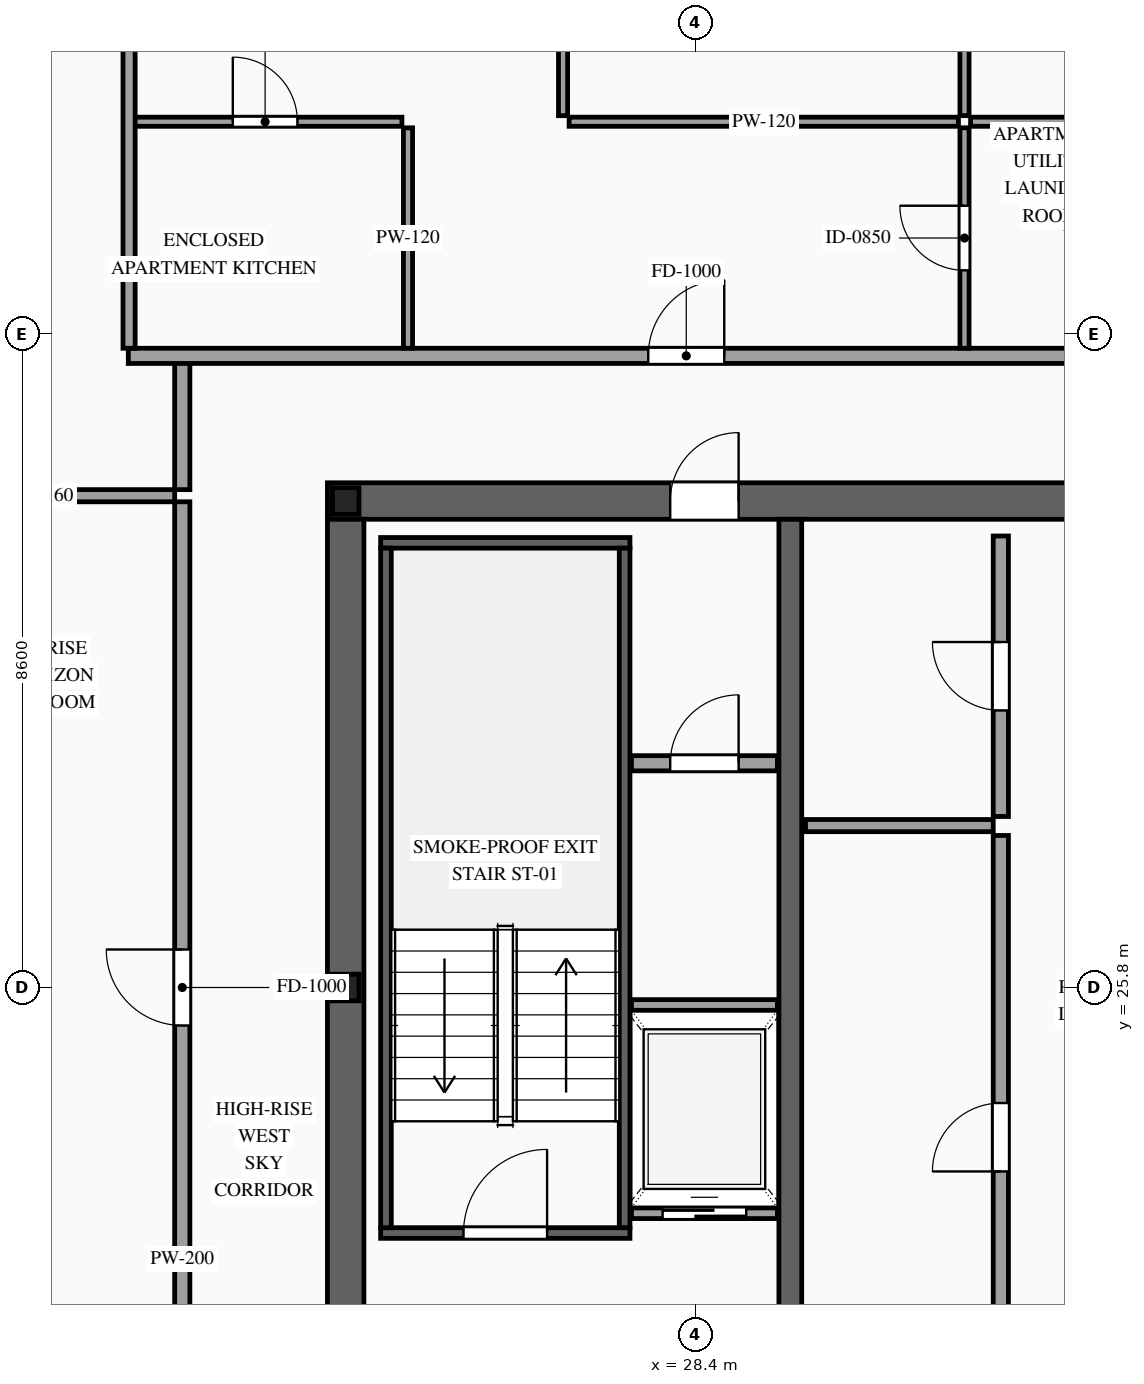
"""IFC4 building model, lengths in metres.
Left out: names, types, materials, properties, quantities, classifications, styles, units other than length and angle.
Written with IfcOpenShell. Run it as: python <this file> out.ifc"""

import sys

from ifc_helpers import new_model, si_unit, direction, frame, frame_2d, origin, origin_2d, place, context, subcontext, project, spatial, rectangle, i_section, extrude, source, transform, mapped, element, fill, save


model = new_model("IFC4")
c1 = context("Model", 3, precision=1e-05, world=origin(), true_north=direction((0.0, 1.0)))
c2 = subcontext(c1, "Body", "Model", "MODEL_VIEW")
j1 = project(units=[si_unit("LENGTHUNIT", "METRE"), si_unit("PLANEANGLEUNIT", "RADIAN")], contexts=[c1])
p1 = place(None, origin())
s1 = spatial("IfcSite", under=j1, at=p1, CompositionType="ELEMENT")
p2 = place(p1, origin())
s2 = spatial("IfcBuilding", under=s1, at=p2, CompositionType="ELEMENT")
p3 = place(p2, frame((0.0, 0.0, 311.2)))
s3 = spatial("IfcBuildingStorey", under=s2, at=p3, CompositionType="ELEMENT", Elevation=311.2)
p4 = place(p3, frame((23.56, 32.2, 0.0), z_axis=(0.0, 0.0, 1.0), x_axis=(1.0, 0.0, 0.0)))
e1 = element("IfcWall", 1, at=p4, inside=s3, PredefinedType="SHEAR", context=c2, shape_type="SweptSolid", body=[
    extrude(rectangle(XDim=26.88, YDim=0.48, at=frame_2d((13.44, 0.0))), origin(), (0.0, 0.0, 1.0), 3.5),
])
p5 = place(p4, frame((4.51, 0.0, 0.0)))
e2 = element("IfcOpeningElement", 2, at=p5, cuts=e1, PredefinedType="OPENING", context=c2, shape_type="SweptSolid", body=[
    extrude(rectangle(XDim=0.9, YDim=2.15, at=frame_2d((0.45, 1.075))), frame((0.0, 0.255, 0.0), z_axis=(0.0, -1.0, 0.0), x_axis=(1.0, 0.0, 0.0)), (0.0, 0.0, 1.0), 0.51),
])
p6 = place(p4, frame((9.79, 0.0, 0.0)))
e3 = element("IfcOpeningElement", 3, at=p6, cuts=e1, PredefinedType="OPENING", context=c2, shape_type="SweptSolid", body=[
    extrude(rectangle(XDim=1.1, YDim=2.2, at=frame_2d((0.55, 1.1))), frame((0.0, 0.255, 0.0), z_axis=(0.0, -1.0, 0.0), x_axis=(1.0, 0.0, 0.0)), (0.0, 0.0, 1.0), 0.51),
])
p7 = place(p4, frame((15.64, 0.0, 0.0)))
e4 = element("IfcOpeningElement", 4, at=p7, cuts=e1, PredefinedType="OPENING", context=c2, shape_type="SweptSolid", body=[
    extrude(rectangle(XDim=1.1, YDim=2.2, at=frame_2d((0.55, 1.1))), frame((0.0, 0.255, 0.0), z_axis=(0.0, -1.0, 0.0), x_axis=(1.0, 0.0, 0.0)), (0.0, 0.0, 1.0), 0.51),
])
p8 = place(p4, frame((18.74, 0.0, 0.0)))
e5 = element("IfcOpeningElement", 5, at=p8, cuts=e1, PredefinedType="OPENING", context=c2, shape_type="SweptSolid", body=[
    extrude(rectangle(XDim=1.1, YDim=2.2, at=frame_2d((0.55, 1.1))), frame((0.0, 0.255, 0.0), z_axis=(0.0, -1.0, 0.0), x_axis=(1.0, 0.0, 0.0)), (0.0, 0.0, 1.0), 0.51),
])
m1 = source(origin(), c2, "Body", "SweptSolid", [
    extrude(rectangle(XDim=12.32, YDim=0.48, at=frame_2d((6.16, 0.0))), origin(), (0.0, 0.0, 1.0), 3.5),
])
p9 = place(p3, frame((23.8, 19.64, 0.0), z_axis=(0.0, 0.0, 1.0), x_axis=(0.0, 1.0, 0.0)))
e6 = element("IfcWall", 6, at=p9, inside=s3, PredefinedType="SHEAR", context=c2, shape_type="MappedRepresentation", body=[
    mapped(m1, transform((0.0, 0.0, 0.0), scale=1.0)),
])
m2 = source(origin(), c2, "Body", "SweptSolid", [
    extrude(rectangle(XDim=12.32, YDim=0.3, at=frame_2d((6.16, 0.0))), origin(), (0.0, 0.0, 1.0), 3.5),
])
p10 = place(p3, frame((29.65, 19.64, 0.0), z_axis=(0.0, 0.0, 1.0), x_axis=(0.0, 1.0, 0.0)))
e7 = element("IfcWall", 7, at=p10, inside=s3, PredefinedType="SOLIDWALL", context=c2, shape_type="MappedRepresentation", body=[
    mapped(m2, transform((0.0, 0.0, 0.0), scale=1.0)),
])
m3 = source(origin(), c2, "Body", "SweptSolid", [
    extrude(i_section(OverallWidth=0.35, OverallDepth=0.35, WebThickness=0.012, FlangeThickness=0.019, at=origin_2d()), origin(), (0.0, 0.0, 1.0), 3.5),
])
for number, where, z_axis, x_axis in (
    (8, (23.8, 25.8, 0.0), (0.0, 0.0, 1.0), (1.0, 0.0, 0.0)),
    (9, (23.8, 32.2, 0.0), (0.0, 0.0, 1.0), (1.0, 0.0, 0.0)),
):
    element("IfcColumn", number, at=place(p3, frame(where, z_axis=z_axis, x_axis=x_axis)), inside=s3, PredefinedType="COLUMN", context=c2, shape_type="MappedRepresentation", body=[
        mapped(m3, transform((0.0, 0.0, 0.0), scale=1.0)),
    ])
p11 = place(p3, frame((27.56, 22.83, 0.0), z_axis=(0.0, 0.0, 1.0), x_axis=(1.0, 0.0, 0.0)))
e10 = element("IfcWall", 10, at=p11, inside=s3, PredefinedType="SOLIDWALL", context=c2, shape_type="SweptSolid", body=[
    extrude(rectangle(XDim=1.92, YDim=0.14, at=frame_2d((0.96, 0.0))), origin(), (0.0, 0.0, 1.0), 3.28),
])
p12 = place(p11, frame((0.41, 0.0, 0.0)))
e11 = element("IfcOpeningElement", 11, at=p12, cuts=e10, PredefinedType="OPENING", context=c2, shape_type="SweptSolid", body=[
    extrude(rectangle(XDim=1.1, YDim=2.2, at=frame_2d((0.55, 1.1))), frame((0.0, 0.085, 0.0), z_axis=(0.0, -1.0, 0.0), x_axis=(1.0, 0.0, 0.0)), (0.0, 0.0, 1.0), 0.17),
])
m4 = source(origin(), c2, "Body", "SweptSolid", [
    extrude(rectangle(XDim=1.92, YDim=0.14, at=frame_2d((0.96, 0.0))), origin(), (0.0, 0.0, 1.0), 3.28),
])
p13 = place(p3, frame((27.56, 25.57, 0.0), z_axis=(0.0, 0.0, 1.0), x_axis=(1.0, 0.0, 0.0)))
e12 = element("IfcWall", 12, at=p13, inside=s3, PredefinedType="SOLIDWALL", context=c2, shape_type="MappedRepresentation", body=[
    mapped(m4, transform((0.0, 0.0, 0.0), scale=1.0)),
])
p14 = place(p3, frame((24.26, 22.57, 0.0), z_axis=(0.0, 0.0, 1.0), x_axis=(1.0, 0.0, 0.0)))
e13 = element("IfcWall", 13, at=p14, inside=s3, PredefinedType="SOLIDWALL", context=c2, shape_type="SweptSolid", body=[
    extrude(rectangle(XDim=3.28, YDim=0.14, at=frame_2d((1.64, 0.0))), origin(), (0.0, 0.0, 1.0), 3.28),
])
p15 = place(p14, frame((1.09, 0.0, 0.0)))
e14 = element("IfcOpeningElement", 14, at=p15, cuts=e13, PredefinedType="OPENING", context=c2, shape_type="SweptSolid", body=[
    extrude(rectangle(XDim=1.1, YDim=2.2, at=frame_2d((0.55, 1.1))), frame((0.0, 0.085, 0.0), z_axis=(0.0, -1.0, 0.0), x_axis=(1.0, 0.0, 0.0)), (0.0, 0.0, 1.0), 0.17),
])
m5 = source(origin(), c2, "Body", "SweptSolid", [
    extrude(rectangle(XDim=3.28, YDim=0.14, at=frame_2d((1.64, 0.0))), origin(), (0.0, 0.0, 1.0), 3.28),
])
p16 = place(p3, frame((24.26, 31.65, 0.0), z_axis=(0.0, 0.0, 1.0), x_axis=(1.0, 0.0, 0.0)))
e15 = element("IfcWall", 15, at=p16, inside=s3, PredefinedType="SOLIDWALL", context=c2, shape_type="MappedRepresentation", body=[
    mapped(m5, transform((0.0, 0.0, 0.0), scale=1.0)),
])
m6 = source(origin(), c2, "Body", "SweptSolid", [
    extrude(rectangle(XDim=8.94, YDim=0.14, at=frame_2d((4.47, 0.0))), origin(), (0.0, 0.0, 1.0), 3.28),
])
for number, where, z_axis, x_axis in (
    (16, (24.33, 22.64, 0.0), (0.0, 0.0, 1.0), (0.0, 1.0, 0.0)),
    (17, (27.47, 22.64, 0.0), (0.0, 0.0, 1.0), (0.0, 1.0, 0.0)),
):
    element("IfcWall", number, at=place(p3, frame(where, z_axis=z_axis, x_axis=x_axis)), inside=s3, PredefinedType="SOLIDWALL", context=c2, shape_type="MappedRepresentation", body=[
        mapped(m6, transform((0.0, 0.0, 0.0), scale=1.0)),
    ])
p17 = place(p3, frame((27.56, 28.75, 0.0), z_axis=(0.0, 0.0, 1.0), x_axis=(1.0, 0.0, 0.0)))
e18 = element("IfcWall", 18, at=p17, inside=s3, PredefinedType="PARTITIONING", context=c2, shape_type="SweptSolid", body=[
    extrude(rectangle(XDim=1.92, YDim=0.2, at=frame_2d((0.96, 0.0))), origin(), (0.0, 0.0, 1.0), 3.28),
])
p18 = place(p17, frame((0.51, 0.0, 0.0)))
e19 = element("IfcOpeningElement", 19, at=p18, cuts=e18, PredefinedType="OPENING", context=c2, shape_type="SweptSolid", body=[
    extrude(rectangle(XDim=0.9, YDim=2.15, at=frame_2d((0.45, 1.075))), frame((0.0, 0.115, 0.0), z_axis=(0.0, -1.0, 0.0), x_axis=(1.0, 0.0, 0.0)), (0.0, 0.0, 1.0), 0.23),
])
p19 = place(p3, frame((32.42, 19.86, 0.0), z_axis=(0.0, 0.0, 1.0), x_axis=(0.0, 1.0, 0.0)))
e20 = element("IfcWall", 20, at=p19, inside=s3, PredefinedType="PARTITIONING", context=c2, shape_type="SweptSolid", body=[
    extrude(rectangle(XDim=7.94, YDim=0.2, at=frame_2d((3.97, 0.0))), origin(), (0.0, 0.0, 1.0), 3.28),
])
p20 = place(p19, frame((3.52, 0.0, 0.0)))
e21 = element("IfcOpeningElement", 21, at=p20, cuts=e20, PredefinedType="OPENING", context=c2, shape_type="SweptSolid", body=[
    extrude(rectangle(XDim=0.9, YDim=2.15, at=frame_2d((0.45, 1.075))), frame((0.0, 0.115, 0.0), z_axis=(0.0, -1.0, 0.0), x_axis=(1.0, 0.0, 0.0)), (0.0, 0.0, 1.0), 0.23),
])
p21 = place(p3, frame((32.42, 28.05, 0.0), z_axis=(0.0, 0.0, 1.0), x_axis=(0.0, 1.0, 0.0)))
e22 = element("IfcWall", 22, at=p21, inside=s3, PredefinedType="PARTITIONING", context=c2, shape_type="SweptSolid", body=[
    extrude(rectangle(XDim=3.69, YDim=0.2, at=frame_2d((1.845, 0.0))), origin(), (0.0, 0.0, 1.0), 3.28),
])
p22 = place(p21, frame((1.395, 0.0, 0.0)))
e23 = element("IfcOpeningElement", 23, at=p22, cuts=e22, PredefinedType="OPENING", context=c2, shape_type="SweptSolid", body=[
    extrude(rectangle(XDim=0.9, YDim=2.15, at=frame_2d((0.45, 1.075))), frame((0.0, 0.115, 0.0), z_axis=(0.0, -1.0, 0.0), x_axis=(1.0, 0.0, 0.0)), (0.0, 0.0, 1.0), 0.23),
])
m7 = source(origin(), c2, "Body", "SweptSolid", [
    extrude(rectangle(XDim=2.47, YDim=0.16, at=frame_2d((1.235, 0.0))), origin(), (0.0, 0.0, 1.0), 3.28),
])
p23 = place(p3, frame((29.85, 27.93, 0.0), z_axis=(0.0, 0.0, 1.0), x_axis=(1.0, 0.0, 0.0)))
e24 = element("IfcWall", 24, at=p23, inside=s3, PredefinedType="PARTITIONING", context=c2, shape_type="MappedRepresentation", body=[
    mapped(m7, transform((0.0, 0.0, 0.0), scale=1.0)),
])
m8 = source(origin(), c2, "Body", "SweptSolid", [
    extrude(rectangle(XDim=1.7, YDim=0.2, at=frame_2d((0.85, 0.0))), origin(), (0.0, 0.0, 1.0), 3.28),
])
p24 = place(p3, frame((21.65, 32.35, 0.0), z_axis=(0.0, 0.0, 1.0), x_axis=(0.0, 1.0, 0.0)))
e25 = element("IfcWall", 25, at=p24, inside=s3, PredefinedType="PARTITIONING", context=c2, shape_type="MappedRepresentation", body=[
    mapped(m8, transform((0.0, 0.0, 0.0), scale=1.0)),
])
p25 = place(p3, frame((20.94, 34.11, 0.0), z_axis=(0.0, 0.0, 1.0), x_axis=(1.0, 0.0, 0.0)))
e26 = element("IfcWall", 26, at=p25, inside=s3, PredefinedType="PARTITIONING", context=c2, shape_type="SweptSolid", body=[
    extrude(rectangle(XDim=15.98, YDim=0.2, at=frame_2d((7.99, 0.0))), origin(), (0.0, 0.0, 1.0), 3.28),
])
p26 = place(p25, frame((6.841, 0.0, 0.0)))
e27 = element("IfcOpeningElement", 27, at=p26, cuts=e26, PredefinedType="OPENING", context=c2, shape_type="SweptSolid", body=[
    extrude(rectangle(XDim=1.0, YDim=2.2, at=frame_2d((0.5, 1.1))), frame((0.0, 0.115, 0.0), z_axis=(0.0, -1.0, 0.0), x_axis=(1.0, 0.0, 0.0)), (0.0, 0.0, 1.0), 0.23),
])
p27 = place(p3, frame((20.94, 37.19, 0.0), z_axis=(0.0, 0.0, 1.0), x_axis=(1.0, 0.0, 0.0)))
e28 = element("IfcWall", 28, at=p27, inside=s3, PredefinedType="PARTITIONING", context=c2, shape_type="SweptSolid", body=[
    extrude(rectangle(XDim=3.6, YDim=0.12, at=frame_2d((1.8, 0.0))), origin(), (0.0, 0.0, 1.0), 3.28),
])
p28 = place(p27, frame((1.375, 0.0, 0.0)))
e29 = element("IfcOpeningElement", 29, at=p28, cuts=e28, PredefinedType="OPENING", context=c2, shape_type="SweptSolid", body=[
    extrude(rectangle(XDim=0.85, YDim=2.1, at=frame_2d((0.425, 1.05))), frame((0.0, 0.075, 0.0), z_axis=(0.0, -1.0, 0.0), x_axis=(1.0, 0.0, 0.0)), (0.0, 0.0, 1.0), 0.15),
])
m9 = source(origin(), c2, "Body", "SweptSolid", [
    extrude(rectangle(XDim=2.9, YDim=0.12, at=frame_2d((1.45, 0.0))), origin(), (0.0, 0.0, 1.0), 3.28),
])
p29 = place(p3, frame((24.62, 34.21, 0.0), z_axis=(0.0, 0.0, 1.0), x_axis=(0.0, 1.0, 0.0)))
e30 = element("IfcWall", 30, at=p29, inside=s3, PredefinedType="PARTITIONING", context=c2, shape_type="MappedRepresentation", body=[
    mapped(m9, transform((0.0, 0.0, 0.0), scale=1.0)),
])
m10 = source(origin(), c2, "Body", "SweptSolid", [
    extrude(rectangle(XDim=4.898, YDim=0.12, at=frame_2d((2.449, 0.0))), origin(), (0.0, 0.0, 1.0), 3.28),
])
p30 = place(p3, frame((32.022, 37.19, 0.0), z_axis=(0.0, 0.0, 1.0), x_axis=(1.0, 0.0, 0.0)))
e31 = element("IfcWall", 31, at=p30, inside=s3, PredefinedType="PARTITIONING", context=c2, shape_type="MappedRepresentation", body=[
    mapped(m10, transform((0.0, 0.0, 0.0), scale=1.0)),
])
p31 = place(p3, frame((31.942, 37.27, 0.0), z_axis=(0.0, 0.0, 1.0), x_axis=(0.0, 1.0, 0.0)))
e32 = element("IfcWall", 32, at=p31, inside=s3, PredefinedType="PARTITIONING", context=c2, shape_type="SweptSolid", body=[
    extrude(rectangle(XDim=7.48, YDim=0.12, at=frame_2d((3.74, 0.0))), origin(), (0.0, 0.0, 1.0), 3.28),
])
p32 = place(p31, frame((3.29, 0.0, 0.0)))
e33 = element("IfcOpeningElement", 33, at=p32, cuts=e32, PredefinedType="OPENING", context=c2, shape_type="SweptSolid", body=[
    extrude(rectangle(XDim=0.9, YDim=2.15, at=frame_2d((0.45, 1.075))), frame((0.0, 0.075, 0.0), z_axis=(0.0, -1.0, 0.0), x_axis=(1.0, 0.0, 0.0)), (0.0, 0.0, 1.0), 0.15),
])
p33 = place(p3, frame((31.942, 34.21, 0.0), z_axis=(0.0, 0.0, 1.0), x_axis=(0.0, 1.0, 0.0)))
e34 = element("IfcWall", 34, at=p33, inside=s3, PredefinedType="PARTITIONING", context=c2, shape_type="SweptSolid", body=[
    extrude(rectangle(XDim=2.9, YDim=0.12, at=frame_2d((1.45, 0.0))), origin(), (0.0, 0.0, 1.0), 3.28),
])
p34 = place(p33, frame((1.025, 0.0, 0.0)))
e35 = element("IfcOpeningElement", 35, at=p34, cuts=e34, PredefinedType="OPENING", context=c2, shape_type="SweptSolid", body=[
    extrude(rectangle(XDim=0.85, YDim=2.1, at=frame_2d((0.425, 1.05))), frame((0.0, 0.075, 0.0), z_axis=(0.0, -1.0, 0.0), x_axis=(1.0, 0.0, 0.0)), (0.0, 0.0, 1.0), 0.15),
])
m11 = source(origin(), c2, "Body", "SweptSolid", [
    extrude(rectangle(XDim=5.122, YDim=0.12, at=frame_2d((2.561, 0.0))), origin(), (0.0, 0.0, 1.0), 3.28),
])
p35 = place(p3, frame((26.74, 37.19, 0.0), z_axis=(0.0, 0.0, 1.0), x_axis=(1.0, 0.0, 0.0)))
e36 = element("IfcWall", 36, at=p35, inside=s3, PredefinedType="PARTITIONING", context=c2, shape_type="MappedRepresentation", body=[
    mapped(m11, transform((0.0, 0.0, 0.0), scale=1.0)),
])
p36 = place(p3, frame((26.66, 37.27, 0.0), z_axis=(0.0, 0.0, 1.0), x_axis=(0.0, 1.0, 0.0)))
e37 = element("IfcWall", 37, at=p36, inside=s3, PredefinedType="PARTITIONING", context=c2, shape_type="SweptSolid", body=[
    extrude(rectangle(XDim=7.48, YDim=0.12, at=frame_2d((3.74, 0.0))), origin(), (0.0, 0.0, 1.0), 3.28),
])
p37 = place(p36, frame((3.29, 0.0, 0.0)))
e38 = element("IfcOpeningElement", 38, at=p37, cuts=e37, PredefinedType="OPENING", context=c2, shape_type="SweptSolid", body=[
    extrude(rectangle(XDim=0.9, YDim=2.15, at=frame_2d((0.45, 1.075))), frame((0.0, 0.075, 0.0), z_axis=(0.0, -1.0, 0.0), x_axis=(1.0, 0.0, 0.0)), (0.0, 0.0, 1.0), 0.15),
])
m12 = source(origin(), c2, "Body", "SweptSolid", [
    extrude(rectangle(XDim=10.39, YDim=0.16, at=frame_2d((5.195, 0.0))), origin(), (0.0, 0.0, 1.0), 3.28),
])
p38 = place(p3, frame((20.95, 34.21, 0.0), z_axis=(0.0, 0.0, 1.0), x_axis=(0.0, 1.0, 0.0)))
e39 = element("IfcWall", 39, at=p38, inside=s3, PredefinedType="PARTITIONING", context=c2, shape_type="MappedRepresentation", body=[
    mapped(m12, transform((0.0, 0.0, 0.0), scale=1.0)),
])
p39 = place(p3, frame((21.65, 19.41, 0.0), z_axis=(0.0, 0.0, 1.0), x_axis=(0.0, 1.0, 0.0)))
e40 = element("IfcWall", 40, at=p39, inside=s3, PredefinedType="PARTITIONING", context=c2, shape_type="SweptSolid", body=[
    extrude(rectangle(XDim=12.78, YDim=0.2, at=frame_2d((6.39, 0.0))), origin(), (0.0, 0.0, 1.0), 3.28),
])
p40 = place(p39, frame((5.89, 0.0, 0.0)))
e41 = element("IfcOpeningElement", 41, at=p40, cuts=e40, PredefinedType="OPENING", context=c2, shape_type="SweptSolid", body=[
    extrude(rectangle(XDim=1.0, YDim=2.2, at=frame_2d((0.5, 1.1))), frame((0.0, 0.115, 0.0), z_axis=(0.0, -1.0, 0.0), x_axis=(1.0, 0.0, 0.0)), (0.0, 0.0, 1.0), 0.23),
])
m13 = source(origin(), c2, "Body", "SweptSolid", [
    extrude(rectangle(XDim=3.5, YDim=0.16, at=frame_2d((1.75, 0.0))), origin(), (0.0, 0.0, 1.0), 2.825),
])
p41 = place(p3, frame((18.05, 32.27, 0.0), z_axis=(0.0, 0.0, 1.0), x_axis=(1.0, 0.0, 0.0)))
e42 = element("IfcWall", 42, at=p41, inside=s3, PredefinedType="PARTITIONING", context=c2, shape_type="MappedRepresentation", body=[
    mapped(m13, transform((0.0, 0.0, 0.0), scale=1.0)),
])
m14 = source(origin(), c2, "Body", "SweptSolid", [
    extrude(rectangle(XDim=1.1, YDim=2.2, at=frame_2d((0.55, 1.1))), frame((0.0, 0.025, 0.0), z_axis=(0.0, -1.0, 0.0), x_axis=(1.0, 0.0, 0.0)), (0.0, 0.0, 1.0), 0.05),
])
p42 = place(p12, origin())
e43 = element("IfcDoor", 43, at=p42, inside=s3, OperationType="SLIDING_TO_LEFT", PredefinedType="DOOR", context=c2, shape_type="MappedRepresentation", body=[
    mapped(m14, transform((0.0, 0.0, 0.0), scale=1.0)),
])
fill(e11, e43)
m15 = source(origin(), c2, "Body", "SweptSolid", [
    extrude(rectangle(XDim=1.1, YDim=2.2, at=frame_2d((0.55, 1.1))), frame((0.0, 0.025, 0.0), z_axis=(0.0, -1.0, 0.0), x_axis=(1.0, 0.0, 0.0)), (0.0, 0.0, 1.0), 0.05),
])
p43 = place(p15, origin())
e44 = element("IfcDoor", 44, at=p43, inside=s3, OperationType="SINGLE_SWING_RIGHT", PredefinedType="DOOR", context=c2, shape_type="MappedRepresentation", body=[
    mapped(m15, transform((0.0, 0.0, 0.0), scale=1.0)),
])
fill(e14, e44)
m16 = source(origin(), c2, "Body", "SweptSolid", [
    extrude(rectangle(XDim=0.9, YDim=2.15, at=frame_2d((0.45, 1.075))), frame((0.0, 0.025, 0.0), z_axis=(0.0, -1.0, 0.0), x_axis=(1.0, 0.0, 0.0)), (0.0, 0.0, 1.0), 0.05),
])
p44 = place(p5, origin())
e45 = element("IfcDoor", 45, at=p44, inside=s3, OperationType="SINGLE_SWING_RIGHT", PredefinedType="DOOR", context=c2, shape_type="MappedRepresentation", body=[
    mapped(m16, transform((0.0, 0.0, 0.0), scale=1.0)),
])
fill(e2, e45)
p45 = place(p18, origin())
e46 = element("IfcDoor", 46, at=p45, inside=s3, OperationType="SINGLE_SWING_RIGHT", PredefinedType="DOOR", context=c2, shape_type="MappedRepresentation", body=[
    mapped(m16, transform((0.0, 0.0, 0.0), scale=1.0)),
])
fill(e19, e46)
p46 = place(p20, origin())
e47 = element("IfcDoor", 47, at=p46, inside=s3, OperationType="SINGLE_SWING_LEFT", PredefinedType="DOOR", context=c2, shape_type="MappedRepresentation", body=[
    mapped(m16, transform((0.0, 0.0, 0.0), scale=1.0)),
])
fill(e21, e47)
p47 = place(p22, origin())
e48 = element("IfcDoor", 48, at=p47, inside=s3, OperationType="SINGLE_SWING_RIGHT", PredefinedType="DOOR", context=c2, shape_type="MappedRepresentation", body=[
    mapped(m16, transform((0.0, 0.0, 0.0), scale=1.0)),
])
fill(e23, e48)
m17 = source(origin(), c2, "Body", "SweptSolid", [
    extrude(rectangle(XDim=1.0, YDim=2.2, at=frame_2d((0.5, 1.1))), frame((0.0, 0.025, 0.0), z_axis=(0.0, -1.0, 0.0), x_axis=(1.0, 0.0, 0.0)), (0.0, 0.0, 1.0), 0.05),
])
p48 = place(p26, origin())
e49 = element("IfcDoor", 49, at=p48, inside=s3, OperationType="SINGLE_SWING_RIGHT", PredefinedType="DOOR", context=c2, shape_type="MappedRepresentation", body=[
    mapped(m17, transform((0.0, 0.0, 0.0), scale=1.0)),
])
fill(e27, e49)
m18 = source(origin(), c2, "Body", "SweptSolid", [
    extrude(rectangle(XDim=0.85, YDim=2.1, at=frame_2d((0.425, 1.05))), frame((0.0, 0.025, 0.0), z_axis=(0.0, -1.0, 0.0), x_axis=(1.0, 0.0, 0.0)), (0.0, 0.0, 1.0), 0.05),
])
p49 = place(p28, origin())
e50 = element("IfcDoor", 50, at=p49, inside=s3, OperationType="SINGLE_SWING_LEFT", PredefinedType="DOOR", context=c2, shape_type="MappedRepresentation", body=[
    mapped(m18, transform((0.0, 0.0, 0.0), scale=1.0)),
])
fill(e29, e50)
p50 = place(p34, origin())
e51 = element("IfcDoor", 51, at=p50, inside=s3, OperationType="SINGLE_SWING_RIGHT", PredefinedType="DOOR", context=c2, shape_type="MappedRepresentation", body=[
    mapped(m18, transform((0.0, 0.0, 0.0), scale=1.0)),
])
fill(e35, e51)
p51 = place(p40, origin())
e52 = element("IfcDoor", 52, at=p51, inside=s3, OperationType="SINGLE_SWING_RIGHT", PredefinedType="DOOR", context=c2, shape_type="MappedRepresentation", body=[
    mapped(m17, transform((0.0, 0.0, 0.0), scale=1.0)),
])
fill(e41, e52)
save(model, sys.argv[1])
